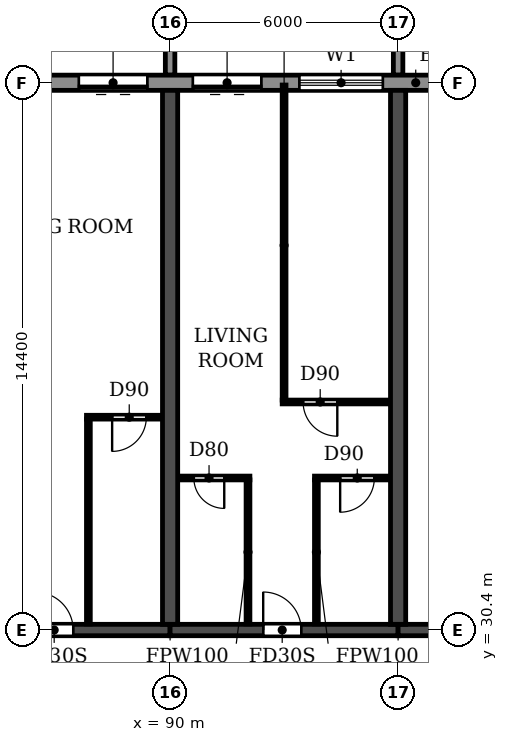
"""IFC4 building model, lengths in metres.
Left out: names, types, materials, properties, quantities, classifications, styles, units other than length and angle.
Written with IfcOpenShell. Run it as: python <this file> out.ifc"""

import sys

from ifc_helpers import new_model, si_unit, direction, frame, frame_2d, origin, place, context, subcontext, project, spatial, polyline, rectangle, outline, extrude, source, transform, mapped, element, fill, save


model = new_model("IFC4")
c1 = context("Model", 3, precision=1e-05, world=origin(), true_north=direction((0.0, 1.0)))
c2 = subcontext(c1, "Body", "Model", "MODEL_VIEW")
j1 = project(units=[si_unit("LENGTHUNIT", "METRE"), si_unit("PLANEANGLEUNIT", "RADIAN")], contexts=[c1])
p1 = place(None, origin())
s1 = spatial("IfcSite", under=j1, at=p1, CompositionType="ELEMENT")
p2 = place(p1, origin())
s2 = spatial("IfcBuilding", under=s1, at=p2, CompositionType="ELEMENT")
p3 = place(p2, frame((0.0, 0.0, 26.7)))
s3 = spatial("IfcBuildingStorey", under=s2, at=p3, CompositionType="ELEMENT", Elevation=26.7)
for number, where, z_axis, x_axis in (
    (1, (90.0, 30.55, 0.0), (0.0, 0.0, 1.0), (0.0, 1.0, 0.0)),
    (2, (96.0, 30.55, 0.0), (0.0, 0.0, 1.0), (0.0, 1.0, 0.0)),
):
    element("IfcWall", number, at=place(p3, frame(where, z_axis=z_axis, x_axis=x_axis)), inside=s3, PredefinedType="SHEAR", context=c2, shape_type="SweptSolid", body=[
        extrude(rectangle(XDim=14.05, YDim=0.4, at=frame_2d((7.025, 0.0))), origin(), (0.0, 0.0, 1.0), 3.05),
    ])
p4 = place(p3, frame((84.0, 30.4, 0.0), z_axis=(0.0, 0.0, 1.0), x_axis=(1.0, 0.0, 0.0)))
e3 = element("IfcWall", 3, at=p4, inside=s3, PredefinedType="SHEAR", context=c2, shape_type="SweptSolid", body=[
    extrude(rectangle(XDim=6.0, YDim=0.3, at=frame_2d((3.0, 0.0))), origin(), (0.0, 0.0, 1.0), 2.45),
])
p5 = place(p4, frame((2.45, 0.0, 0.0)))
e4 = element("IfcOpeningElement", 4, at=p5, cuts=e3, PredefinedType="OPENING", context=c2, shape_type="SweptSolid", body=[
    extrude(rectangle(XDim=1.0, YDim=2.1, at=frame_2d((0.5, 1.05))), frame((0.0, 0.16, 0.0), z_axis=(0.0, -1.0, 0.0), x_axis=(1.0, 0.0, 0.0)), (0.0, 0.0, 1.0), 0.32),
])
p6 = place(p3, frame((90.0, 30.4, 0.0), z_axis=(0.0, 0.0, 1.0), x_axis=(1.0, 0.0, 0.0)))
e5 = element("IfcWall", 5, at=p6, inside=s3, PredefinedType="SHEAR", context=c2, shape_type="SweptSolid", body=[
    extrude(rectangle(XDim=6.0, YDim=0.3, at=frame_2d((3.0, 0.0))), origin(), (0.0, 0.0, 1.0), 2.45),
])
p7 = place(p6, frame((2.45, 0.0, 0.0)))
e6 = element("IfcOpeningElement", 6, at=p7, cuts=e5, PredefinedType="OPENING", context=c2, shape_type="SweptSolid", body=[
    extrude(rectangle(XDim=1.0, YDim=2.1, at=frame_2d((0.5, 1.05))), frame((0.0, 0.16, 0.0), z_axis=(0.0, -1.0, 0.0), x_axis=(1.0, 0.0, 0.0)), (0.0, 0.0, 1.0), 0.32),
])
p8 = place(p3, frame((96.0, 30.4, 0.0), z_axis=(0.0, 0.0, 1.0), x_axis=(1.0, 0.0, 0.0)))
e7 = element("IfcWall", 7, at=p8, inside=s3, PredefinedType="SHEAR", context=c2, shape_type="SweptSolid", body=[
    extrude(rectangle(XDim=5.8, YDim=0.3, at=frame_2d((2.9, 0.0))), origin(), (0.0, 0.0, 1.0), 2.45),
])
p9 = place(p8, frame((2.5, 0.0, 0.0)))
e8 = element("IfcOpeningElement", 8, at=p9, cuts=e7, PredefinedType="OPENING", context=c2, shape_type="SweptSolid", body=[
    extrude(rectangle(XDim=1.0, YDim=2.1, at=frame_2d((0.5, 1.05))), frame((0.0, 0.16, 0.0), z_axis=(0.0, -1.0, 0.0), x_axis=(1.0, 0.0, 0.0)), (0.0, 0.0, 1.0), 0.32),
])
p10 = place(p3, frame((97.317, 44.8, 0.0), z_axis=(0.0, 0.0, 1.0), x_axis=(-1.0, 0.0, 0.0)))
e9 = element("IfcWall", 9, at=p10, inside=s3, PredefinedType="STANDARD", context=c2, shape_type="SweptSolid", body=[
    extrude(rectangle(XDim=92.634, YDim=0.4, at=frame_2d((46.317, 0.0))), origin(), (0.0, 0.0, 1.0), 3.05),
])
p11 = place(p10, frame((88.717, 0.0, 0.9)))
e10 = element("IfcOpeningElement", 10, at=p11, cuts=e9, PredefinedType="OPENING", context=c2, shape_type="SweptSolid", body=[
    extrude(rectangle(XDim=2.2, YDim=1.5, at=frame_2d((1.1, 0.75))), frame((0.0, 0.21, 0.0), z_axis=(0.0, -1.0, 0.0), x_axis=(1.0, 0.0, 0.0)), (0.0, 0.0, 1.0), 0.42),
])
p12 = place(p10, frame((85.917, 0.0, 0.0)))
e11 = element("IfcOpeningElement", 11, at=p12, cuts=e9, PredefinedType="OPENING", context=c2, shape_type="SweptSolid", body=[
    extrude(rectangle(XDim=1.8, YDim=2.4, at=frame_2d((0.9, 1.2))), frame((0.0, 0.21, 0.0), z_axis=(0.0, -1.0, 0.0), x_axis=(1.0, 0.0, 0.0)), (0.0, 0.0, 1.0), 0.42),
])
p13 = place(p10, frame((82.717, 0.0, 0.9)))
e12 = element("IfcOpeningElement", 12, at=p13, cuts=e9, PredefinedType="OPENING", context=c2, shape_type="SweptSolid", body=[
    extrude(rectangle(XDim=2.2, YDim=1.5, at=frame_2d((1.1, 0.75))), frame((0.0, 0.21, 0.0), z_axis=(0.0, -1.0, 0.0), x_axis=(1.0, 0.0, 0.0)), (0.0, 0.0, 1.0), 0.42),
])
p14 = place(p10, frame((79.717, 0.0, 0.9)))
e13 = element("IfcOpeningElement", 13, at=p14, cuts=e9, PredefinedType="OPENING", context=c2, shape_type="SweptSolid", body=[
    extrude(rectangle(XDim=2.2, YDim=1.5, at=frame_2d((1.1, 0.75))), frame((0.0, 0.21, 0.0), z_axis=(0.0, -1.0, 0.0), x_axis=(1.0, 0.0, 0.0)), (0.0, 0.0, 1.0), 0.42),
])
p15 = place(p10, frame((76.917, 0.0, 0.0)))
e14 = element("IfcOpeningElement", 14, at=p15, cuts=e9, PredefinedType="OPENING", context=c2, shape_type="SweptSolid", body=[
    extrude(rectangle(XDim=1.8, YDim=2.4, at=frame_2d((0.9, 1.2))), frame((0.0, 0.21, 0.0), z_axis=(0.0, -1.0, 0.0), x_axis=(1.0, 0.0, 0.0)), (0.0, 0.0, 1.0), 0.42),
])
p16 = place(p10, frame((73.717, 0.0, 0.9)))
e15 = element("IfcOpeningElement", 15, at=p16, cuts=e9, PredefinedType="OPENING", context=c2, shape_type="SweptSolid", body=[
    extrude(rectangle(XDim=2.2, YDim=1.5, at=frame_2d((1.1, 0.75))), frame((0.0, 0.21, 0.0), z_axis=(0.0, -1.0, 0.0), x_axis=(1.0, 0.0, 0.0)), (0.0, 0.0, 1.0), 0.42),
])
p17 = place(p10, frame((70.717, 0.0, 0.9)))
e16 = element("IfcOpeningElement", 16, at=p17, cuts=e9, PredefinedType="OPENING", context=c2, shape_type="SweptSolid", body=[
    extrude(rectangle(XDim=2.2, YDim=1.5, at=frame_2d((1.1, 0.75))), frame((0.0, 0.21, 0.0), z_axis=(0.0, -1.0, 0.0), x_axis=(1.0, 0.0, 0.0)), (0.0, 0.0, 1.0), 0.42),
])
p18 = place(p10, frame((67.717, 0.0, 0.9)))
e17 = element("IfcOpeningElement", 17, at=p18, cuts=e9, PredefinedType="OPENING", context=c2, shape_type="SweptSolid", body=[
    extrude(rectangle(XDim=2.2, YDim=1.5, at=frame_2d((1.1, 0.75))), frame((0.0, 0.21, 0.0), z_axis=(0.0, -1.0, 0.0), x_axis=(1.0, 0.0, 0.0)), (0.0, 0.0, 1.0), 0.42),
])
p19 = place(p10, frame((64.917, 0.0, 0.0)))
e18 = element("IfcOpeningElement", 18, at=p19, cuts=e9, PredefinedType="OPENING", context=c2, shape_type="SweptSolid", body=[
    extrude(rectangle(XDim=1.8, YDim=2.4, at=frame_2d((0.9, 1.2))), frame((0.0, 0.21, 0.0), z_axis=(0.0, -1.0, 0.0), x_axis=(1.0, 0.0, 0.0)), (0.0, 0.0, 1.0), 0.42),
])
p20 = place(p10, frame((61.717, 0.0, 0.9)))
e19 = element("IfcOpeningElement", 19, at=p20, cuts=e9, PredefinedType="OPENING", context=c2, shape_type="SweptSolid", body=[
    extrude(rectangle(XDim=2.2, YDim=1.5, at=frame_2d((1.1, 0.75))), frame((0.0, 0.21, 0.0), z_axis=(0.0, -1.0, 0.0), x_axis=(1.0, 0.0, 0.0)), (0.0, 0.0, 1.0), 0.42),
])
p21 = place(p10, frame((58.717, 0.0, 0.9)))
e20 = element("IfcOpeningElement", 20, at=p21, cuts=e9, PredefinedType="OPENING", context=c2, shape_type="SweptSolid", body=[
    extrude(rectangle(XDim=2.2, YDim=1.5, at=frame_2d((1.1, 0.75))), frame((0.0, 0.21, 0.0), z_axis=(0.0, -1.0, 0.0), x_axis=(1.0, 0.0, 0.0)), (0.0, 0.0, 1.0), 0.42),
])
p22 = place(p10, frame((55.917, 0.0, 0.0)))
e21 = element("IfcOpeningElement", 21, at=p22, cuts=e9, PredefinedType="OPENING", context=c2, shape_type="SweptSolid", body=[
    extrude(rectangle(XDim=1.8, YDim=2.4, at=frame_2d((0.9, 1.2))), frame((0.0, 0.21, 0.0), z_axis=(0.0, -1.0, 0.0), x_axis=(1.0, 0.0, 0.0)), (0.0, 0.0, 1.0), 0.42),
])
p23 = place(p10, frame((52.917, 0.0, 0.0)))
e22 = element("IfcOpeningElement", 22, at=p23, cuts=e9, PredefinedType="OPENING", context=c2, shape_type="SweptSolid", body=[
    extrude(rectangle(XDim=1.8, YDim=2.4, at=frame_2d((0.9, 1.2))), frame((0.0, 0.21, 0.0), z_axis=(0.0, -1.0, 0.0), x_axis=(1.0, 0.0, 0.0)), (0.0, 0.0, 1.0), 0.42),
])
p24 = place(p10, frame((49.717, 0.0, 0.9)))
e23 = element("IfcOpeningElement", 23, at=p24, cuts=e9, PredefinedType="OPENING", context=c2, shape_type="SweptSolid", body=[
    extrude(rectangle(XDim=2.2, YDim=1.5, at=frame_2d((1.1, 0.75))), frame((0.0, 0.21, 0.0), z_axis=(0.0, -1.0, 0.0), x_axis=(1.0, 0.0, 0.0)), (0.0, 0.0, 1.0), 0.42),
])
p25 = place(p10, frame((46.917, 0.0, 0.0)))
e24 = element("IfcOpeningElement", 24, at=p25, cuts=e9, PredefinedType="OPENING", context=c2, shape_type="SweptSolid", body=[
    extrude(rectangle(XDim=1.8, YDim=2.4, at=frame_2d((0.9, 1.2))), frame((0.0, 0.21, 0.0), z_axis=(0.0, -1.0, 0.0), x_axis=(1.0, 0.0, 0.0)), (0.0, 0.0, 1.0), 0.42),
])
p26 = place(p10, frame((43.717, 0.0, 0.9)))
e25 = element("IfcOpeningElement", 25, at=p26, cuts=e9, PredefinedType="OPENING", context=c2, shape_type="SweptSolid", body=[
    extrude(rectangle(XDim=2.2, YDim=1.5, at=frame_2d((1.1, 0.75))), frame((0.0, 0.21, 0.0), z_axis=(0.0, -1.0, 0.0), x_axis=(1.0, 0.0, 0.0)), (0.0, 0.0, 1.0), 0.42),
])
p27 = place(p10, frame((40.717, 0.0, 0.9)))
e26 = element("IfcOpeningElement", 26, at=p27, cuts=e9, PredefinedType="OPENING", context=c2, shape_type="SweptSolid", body=[
    extrude(rectangle(XDim=2.2, YDim=1.5, at=frame_2d((1.1, 0.75))), frame((0.0, 0.21, 0.0), z_axis=(0.0, -1.0, 0.0), x_axis=(1.0, 0.0, 0.0)), (0.0, 0.0, 1.0), 0.42),
])
p28 = place(p10, frame((37.917, 0.0, 0.0)))
e27 = element("IfcOpeningElement", 27, at=p28, cuts=e9, PredefinedType="OPENING", context=c2, shape_type="SweptSolid", body=[
    extrude(rectangle(XDim=1.8, YDim=2.4, at=frame_2d((0.9, 1.2))), frame((0.0, 0.21, 0.0), z_axis=(0.0, -1.0, 0.0), x_axis=(1.0, 0.0, 0.0)), (0.0, 0.0, 1.0), 0.42),
])
p29 = place(p10, frame((34.917, 0.0, 0.0)))
e28 = element("IfcOpeningElement", 28, at=p29, cuts=e9, PredefinedType="OPENING", context=c2, shape_type="SweptSolid", body=[
    extrude(rectangle(XDim=1.8, YDim=2.4, at=frame_2d((0.9, 1.2))), frame((0.0, 0.21, 0.0), z_axis=(0.0, -1.0, 0.0), x_axis=(1.0, 0.0, 0.0)), (0.0, 0.0, 1.0), 0.42),
])
p30 = place(p10, frame((31.717, 0.0, 0.9)))
e29 = element("IfcOpeningElement", 29, at=p30, cuts=e9, PredefinedType="OPENING", context=c2, shape_type="SweptSolid", body=[
    extrude(rectangle(XDim=2.2, YDim=1.5, at=frame_2d((1.1, 0.75))), frame((0.0, 0.21, 0.0), z_axis=(0.0, -1.0, 0.0), x_axis=(1.0, 0.0, 0.0)), (0.0, 0.0, 1.0), 0.42),
])
p31 = place(p10, frame((28.717, 0.0, 0.9)))
e30 = element("IfcOpeningElement", 30, at=p31, cuts=e9, PredefinedType="OPENING", context=c2, shape_type="SweptSolid", body=[
    extrude(rectangle(XDim=2.2, YDim=1.5, at=frame_2d((1.1, 0.75))), frame((0.0, 0.21, 0.0), z_axis=(0.0, -1.0, 0.0), x_axis=(1.0, 0.0, 0.0)), (0.0, 0.0, 1.0), 0.42),
])
p32 = place(p10, frame((25.717, 0.0, 0.9)))
e31 = element("IfcOpeningElement", 31, at=p32, cuts=e9, PredefinedType="OPENING", context=c2, shape_type="SweptSolid", body=[
    extrude(rectangle(XDim=2.2, YDim=1.5, at=frame_2d((1.1, 0.75))), frame((0.0, 0.21, 0.0), z_axis=(0.0, -1.0, 0.0), x_axis=(1.0, 0.0, 0.0)), (0.0, 0.0, 1.0), 0.42),
])
p33 = place(p10, frame((22.717, 0.0, 0.9)))
e32 = element("IfcOpeningElement", 32, at=p33, cuts=e9, PredefinedType="OPENING", context=c2, shape_type="SweptSolid", body=[
    extrude(rectangle(XDim=2.2, YDim=1.5, at=frame_2d((1.1, 0.75))), frame((0.0, 0.21, 0.0), z_axis=(0.0, -1.0, 0.0), x_axis=(1.0, 0.0, 0.0)), (0.0, 0.0, 1.0), 0.42),
])
p34 = place(p10, frame((19.917, 0.0, 0.0)))
e33 = element("IfcOpeningElement", 33, at=p34, cuts=e9, PredefinedType="OPENING", context=c2, shape_type="SweptSolid", body=[
    extrude(rectangle(XDim=1.8, YDim=2.4, at=frame_2d((0.9, 1.2))), frame((0.0, 0.21, 0.0), z_axis=(0.0, -1.0, 0.0), x_axis=(1.0, 0.0, 0.0)), (0.0, 0.0, 1.0), 0.42),
])
p35 = place(p10, frame((16.717, 0.0, 0.9)))
e34 = element("IfcOpeningElement", 34, at=p35, cuts=e9, PredefinedType="OPENING", context=c2, shape_type="SweptSolid", body=[
    extrude(rectangle(XDim=2.2, YDim=1.5, at=frame_2d((1.1, 0.75))), frame((0.0, 0.21, 0.0), z_axis=(0.0, -1.0, 0.0), x_axis=(1.0, 0.0, 0.0)), (0.0, 0.0, 1.0), 0.42),
])
p36 = place(p10, frame((13.717, 0.0, 0.9)))
e35 = element("IfcOpeningElement", 35, at=p36, cuts=e9, PredefinedType="OPENING", context=c2, shape_type="SweptSolid", body=[
    extrude(rectangle(XDim=2.2, YDim=1.5, at=frame_2d((1.1, 0.75))), frame((0.0, 0.21, 0.0), z_axis=(0.0, -1.0, 0.0), x_axis=(1.0, 0.0, 0.0)), (0.0, 0.0, 1.0), 0.42),
])
p37 = place(p10, frame((10.717, 0.0, 0.9)))
e36 = element("IfcOpeningElement", 36, at=p37, cuts=e9, PredefinedType="OPENING", context=c2, shape_type="SweptSolid", body=[
    extrude(rectangle(XDim=2.2, YDim=1.5, at=frame_2d((1.1, 0.75))), frame((0.0, 0.21, 0.0), z_axis=(0.0, -1.0, 0.0), x_axis=(1.0, 0.0, 0.0)), (0.0, 0.0, 1.0), 0.42),
])
p38 = place(p10, frame((7.917, 0.0, 0.0)))
e37 = element("IfcOpeningElement", 37, at=p38, cuts=e9, PredefinedType="OPENING", context=c2, shape_type="SweptSolid", body=[
    extrude(rectangle(XDim=1.8, YDim=2.4, at=frame_2d((0.9, 1.2))), frame((0.0, 0.21, 0.0), z_axis=(0.0, -1.0, 0.0), x_axis=(1.0, 0.0, 0.0)), (0.0, 0.0, 1.0), 0.42),
])
p39 = place(p10, frame((4.917, 0.0, 0.0)))
e38 = element("IfcOpeningElement", 38, at=p39, cuts=e9, PredefinedType="OPENING", context=c2, shape_type="SweptSolid", body=[
    extrude(rectangle(XDim=1.8, YDim=2.4, at=frame_2d((0.9, 1.2))), frame((0.0, 0.21, 0.0), z_axis=(0.0, -1.0, 0.0), x_axis=(1.0, 0.0, 0.0)), (0.0, 0.0, 1.0), 0.42),
])
p40 = place(p10, frame((1.717, 0.0, 0.9)))
e39 = element("IfcOpeningElement", 39, at=p40, cuts=e9, PredefinedType="OPENING", context=c2, shape_type="SweptSolid", body=[
    extrude(rectangle(XDim=2.2, YDim=1.5, at=frame_2d((1.1, 0.75))), frame((0.0, 0.21, 0.0), z_axis=(0.0, -1.0, 0.0), x_axis=(1.0, 0.0, 0.0)), (0.0, 0.0, 1.0), 0.42),
])
m1 = source(origin(), c2, "Body", "SweptSolid", [
    extrude(outline(polyline([(0.0, 0.0), (0.25, 0.0), (0.25, 3.1), (0.0, 3.1), (0.0, 0.0)])), origin(), (0.0, 0.0, 1.0), 3.1),
])
for number, where in (
    (40, (89.875, 45.0, 0.0)),
    (41, (95.875, 45.0, 0.0)),
):
    element("IfcWall", number, at=place(p3, frame(where)), inside=s3, PredefinedType="STANDARD", context=c2, shape_type="MappedRepresentation", body=[
        mapped(m1, transform((0.0, 0.0, 0.0))),
    ])
p41 = place(p3, frame((90.21, 34.4, 0.0), z_axis=(0.0, 0.0, 1.0), x_axis=(1.0, 0.0, 0.0)))
e42 = element("IfcWall", 42, at=p41, inside=s3, PredefinedType="PARTITIONING", context=c2, shape_type="SweptSolid", body=[
    extrude(rectangle(XDim=1.89, YDim=0.1, at=frame_2d((0.945, 0.0))), origin(), (0.0, 0.0, 1.0), 3.05),
])
p42 = place(p41, frame((0.415, 0.0, 0.0)))
e43 = element("IfcOpeningElement", 43, at=p42, cuts=e42, PredefinedType="OPENING", context=c2, shape_type="SweptSolid", body=[
    extrude(rectangle(XDim=0.8, YDim=2.1, at=frame_2d((0.4, 1.05))), frame((0.0, 0.06, 0.0), z_axis=(0.0, -1.0, 0.0), x_axis=(1.0, 0.0, 0.0)), (0.0, 0.0, 1.0), 0.12),
])
p43 = place(p3, frame((93.8, 34.4, 0.0), z_axis=(0.0, 0.0, 1.0), x_axis=(1.0, 0.0, 0.0)))
e44 = element("IfcWall", 44, at=p43, inside=s3, PredefinedType="PARTITIONING", context=c2, shape_type="SweptSolid", body=[
    extrude(rectangle(XDim=1.99, YDim=0.1, at=frame_2d((0.995, 0.0))), origin(), (0.0, 0.0, 1.0), 3.05),
])
p44 = place(p43, frame((0.675, 0.0, 0.0)))
e45 = element("IfcOpeningElement", 45, at=p44, cuts=e44, PredefinedType="OPENING", context=c2, shape_type="SweptSolid", body=[
    extrude(rectangle(XDim=0.9, YDim=2.1, at=frame_2d((0.45, 1.05))), frame((0.0, 0.06, 0.0), z_axis=(0.0, -1.0, 0.0), x_axis=(1.0, 0.0, 0.0)), (0.0, 0.0, 1.0), 0.12),
])
p45 = place(p3, frame((87.8, 36.0, 0.0), z_axis=(0.0, 0.0, 1.0), x_axis=(1.0, 0.0, 0.0)))
e46 = element("IfcWall", 46, at=p45, inside=s3, PredefinedType="PARTITIONING", context=c2, shape_type="SweptSolid", body=[
    extrude(rectangle(XDim=1.99, YDim=0.1, at=frame_2d((0.995, 0.0))), origin(), (0.0, 0.0, 1.0), 3.05),
])
p46 = place(p45, frame((0.675, 0.0, 0.0)))
e47 = element("IfcOpeningElement", 47, at=p46, cuts=e46, PredefinedType="OPENING", context=c2, shape_type="SweptSolid", body=[
    extrude(rectangle(XDim=0.9, YDim=2.1, at=frame_2d((0.45, 1.05))), frame((0.0, 0.06, 0.0), z_axis=(0.0, -1.0, 0.0), x_axis=(1.0, 0.0, 0.0)), (0.0, 0.0, 1.0), 0.12),
])
p47 = place(p3, frame((92.95, 36.4, 0.0), z_axis=(0.0, 0.0, 1.0), x_axis=(1.0, 0.0, 0.0)))
e48 = element("IfcWall", 48, at=p47, inside=s3, PredefinedType="PARTITIONING", context=c2, shape_type="SweptSolid", body=[
    extrude(rectangle(XDim=2.84, YDim=0.1, at=frame_2d((1.42, 0.0))), origin(), (0.0, 0.0, 1.0), 3.05),
])
p48 = place(p47, frame((0.55, 0.0, 0.0)))
e49 = element("IfcOpeningElement", 49, at=p48, cuts=e48, PredefinedType="OPENING", context=c2, shape_type="SweptSolid", body=[
    extrude(rectangle(XDim=0.9, YDim=2.1, at=frame_2d((0.45, 1.05))), frame((0.0, 0.06, 0.0), z_axis=(0.0, -1.0, 0.0), x_axis=(1.0, 0.0, 0.0)), (0.0, 0.0, 1.0), 0.12),
])
p49 = place(p3, frame((87.85, 30.56, 0.0), z_axis=(0.0, 0.0, 1.0), x_axis=(0.0, 1.0, 0.0)))
e50 = element("IfcWall", 50, at=p49, inside=s3, PredefinedType="PARTITIONING", context=c2, shape_type="SweptSolid", body=[
    extrude(rectangle(XDim=5.39, YDim=0.1, at=frame_2d((2.695, 0.0))), origin(), (0.0, 0.0, 1.0), 3.05),
])
p50 = place(p3, frame((92.05, 30.56, 0.0), z_axis=(0.0, 0.0, 1.0), x_axis=(0.0, 1.0, 0.0)))
e51 = element("IfcWall", 51, at=p50, inside=s3, PredefinedType="PARTITIONING", context=c2, shape_type="SweptSolid", body=[
    extrude(rectangle(XDim=3.79, YDim=0.1, at=frame_2d((1.895, 0.0))), origin(), (0.0, 0.0, 1.0), 3.05),
])
p51 = place(p3, frame((93.0, 36.45, 0.0), z_axis=(0.0, 0.0, 1.0), x_axis=(0.0, 1.0, 0.0)))
e52 = element("IfcWall", 52, at=p51, inside=s3, PredefinedType="PARTITIONING", context=c2, shape_type="SweptSolid", body=[
    extrude(rectangle(XDim=8.29, YDim=0.1, at=frame_2d((4.145, 0.0))), origin(), (0.0, 0.0, 1.0), 3.05),
])
p52 = place(p3, frame((93.85, 30.56, 0.0), z_axis=(0.0, 0.0, 1.0), x_axis=(0.0, 1.0, 0.0)))
e53 = element("IfcWall", 53, at=p52, inside=s3, PredefinedType="PARTITIONING", context=c2, shape_type="SweptSolid", body=[
    extrude(rectangle(XDim=3.79, YDim=0.1, at=frame_2d((1.895, 0.0))), origin(), (0.0, 0.0, 1.0), 3.05),
])
p53 = place(p38, origin())
e54 = element("IfcDoor", 54, at=p53, inside=s3, OperationType="DOUBLE_DOOR_SLIDING", PredefinedType="DOOR", context=c2, shape_type="SweptSolid", body=[
    extrude(rectangle(XDim=1.8, YDim=2.4, at=frame_2d((0.9, 1.2))), frame((0.0, 0.025, 0.0), z_axis=(0.0, -1.0, 0.0), x_axis=(1.0, 0.0, 0.0)), (0.0, 0.0, 1.0), 0.05),
])
fill(e37, e54)
p54 = place(p39, origin())
e55 = element("IfcDoor", 55, at=p54, inside=s3, OperationType="DOUBLE_DOOR_SLIDING", PredefinedType="DOOR", context=c2, shape_type="SweptSolid", body=[
    extrude(rectangle(XDim=1.8, YDim=2.4, at=frame_2d((0.9, 1.2))), frame((0.0, 0.025, 0.0), z_axis=(0.0, -1.0, 0.0), x_axis=(1.0, 0.0, 0.0)), (0.0, 0.0, 1.0), 0.05),
])
fill(e38, e55)
p55 = place(p40, origin())
e56 = element("IfcWindow", 56, at=p55, inside=s3, PartitioningType="DOUBLE_PANEL_HORIZONTAL", PredefinedType="WINDOW", context=c2, shape_type="SweptSolid", body=[
    extrude(rectangle(XDim=2.2, YDim=1.5, at=frame_2d((1.1, 0.75))), frame((0.0, 0.03, 0.0), z_axis=(0.0, -1.0, 0.0), x_axis=(1.0, 0.0, 0.0)), (0.0, 0.0, 1.0), 0.06),
])
fill(e39, e56)
p56 = place(p5, origin())
e57 = element("IfcDoor", 57, at=p56, inside=s3, OperationType="SINGLE_SWING_LEFT", PredefinedType="DOOR", context=c2, shape_type="SweptSolid", body=[
    extrude(rectangle(XDim=1.0, YDim=2.1, at=frame_2d((0.5, 1.05))), frame((0.0, 0.025, 0.0), z_axis=(0.0, -1.0, 0.0), x_axis=(1.0, 0.0, 0.0)), (0.0, 0.0, 1.0), 0.05),
])
fill(e4, e57)
p57 = place(p46, frame((0.9, 0.0, 0.0), z_axis=(0.0, 0.0, 1.0), x_axis=(-1.0, 0.0, 0.0)))
e58 = element("IfcDoor", 58, at=p57, inside=s3, OperationType="SINGLE_SWING_RIGHT", PredefinedType="DOOR", context=c2, shape_type="SweptSolid", body=[
    extrude(rectangle(XDim=0.9, YDim=2.1, at=frame_2d((0.45, 1.05))), frame((0.0, 0.025, 0.0), z_axis=(0.0, -1.0, 0.0), x_axis=(1.0, 0.0, 0.0)), (0.0, 0.0, 1.0), 0.05),
])
fill(e47, e58)
p58 = place(p42, frame((0.8, 0.0, 0.0), z_axis=(0.0, 0.0, 1.0), x_axis=(-1.0, 0.0, 0.0)))
e59 = element("IfcDoor", 59, at=p58, inside=s3, OperationType="SINGLE_SWING_LEFT", PredefinedType="DOOR", context=c2, shape_type="SweptSolid", body=[
    extrude(rectangle(XDim=0.8, YDim=2.1, at=frame_2d((0.4, 1.05))), frame((0.0, 0.025, 0.0), z_axis=(0.0, -1.0, 0.0), x_axis=(1.0, 0.0, 0.0)), (0.0, 0.0, 1.0), 0.05),
])
fill(e43, e59)
p59 = place(p7, origin())
e60 = element("IfcDoor", 60, at=p59, inside=s3, OperationType="SINGLE_SWING_LEFT", PredefinedType="DOOR", context=c2, shape_type="SweptSolid", body=[
    extrude(rectangle(XDim=1.0, YDim=2.1, at=frame_2d((0.5, 1.05))), frame((0.0, 0.025, 0.0), z_axis=(0.0, -1.0, 0.0), x_axis=(1.0, 0.0, 0.0)), (0.0, 0.0, 1.0), 0.05),
])
fill(e6, e60)
p60 = place(p48, frame((0.9, 0.0, 0.0), z_axis=(0.0, 0.0, 1.0), x_axis=(-1.0, 0.0, 0.0)))
e61 = element("IfcDoor", 61, at=p60, inside=s3, OperationType="SINGLE_SWING_LEFT", PredefinedType="DOOR", context=c2, shape_type="SweptSolid", body=[
    extrude(rectangle(XDim=0.9, YDim=2.1, at=frame_2d((0.45, 1.05))), frame((0.0, 0.025, 0.0), z_axis=(0.0, -1.0, 0.0), x_axis=(1.0, 0.0, 0.0)), (0.0, 0.0, 1.0), 0.05),
])
fill(e49, e61)
p61 = place(p44, frame((0.9, 0.0, 0.0), z_axis=(0.0, 0.0, 1.0), x_axis=(-1.0, 0.0, 0.0)))
e62 = element("IfcDoor", 62, at=p61, inside=s3, OperationType="SINGLE_SWING_RIGHT", PredefinedType="DOOR", context=c2, shape_type="SweptSolid", body=[
    extrude(rectangle(XDim=0.9, YDim=2.1, at=frame_2d((0.45, 1.05))), frame((0.0, 0.025, 0.0), z_axis=(0.0, -1.0, 0.0), x_axis=(1.0, 0.0, 0.0)), (0.0, 0.0, 1.0), 0.05),
])
fill(e45, e62)
save(model, sys.argv[1])
